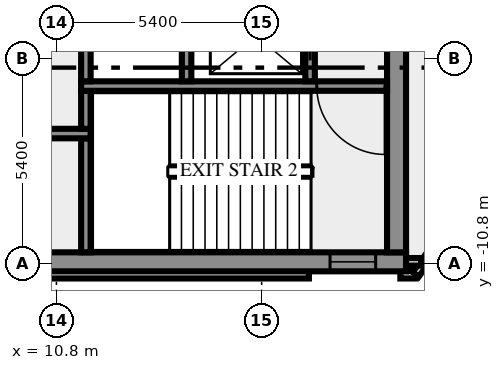
"""IFC4 building model, lengths in metres.
Left out: names, types, materials, properties, quantities, classifications, styles, units other than length and angle.
Written with IfcOpenShell. Run it as: python <this file> out.ifc"""

import sys

from ifc_helpers import new_model, si_unit, direction, frame, frame_2d, origin, place, context, subcontext, project, spatial, rectangle, extrude, element, fill, save


model = new_model("IFC4")
c1 = context("Model", 3, precision=1e-05, world=origin(), true_north=direction((0.0, 1.0)))
c2 = subcontext(c1, "Body", "Model", "MODEL_VIEW")
j1 = project(units=[si_unit("LENGTHUNIT", "METRE"), si_unit("PLANEANGLEUNIT", "RADIAN")], contexts=[c1])
p1 = place(None, origin())
s1 = spatial("IfcSite", under=j1, at=p1, CompositionType="ELEMENT")
p2 = place(p1, origin())
s2 = spatial("IfcBuilding", under=s1, at=p2, CompositionType="ELEMENT")
p3 = place(p2, frame((0.0, 0.0, 343.0)))
s3 = spatial("IfcBuildingStorey", under=s2, at=p3, CompositionType="ELEMENT", Elevation=343.0)
p4 = place(p3, frame((-17.444, -11.088, 0.0), z_axis=(0.0, 0.0, 1.0), x_axis=(1.0, 0.0, 0.0)))
e1 = element("IfcWall", 1, at=p4, inside=s3, PredefinedType="SOLIDWALL", context=c2, shape_type="SweptSolid", body=[
    extrude(rectangle(XDim=34.888, YDim=0.2, at=frame_2d((17.444, 0.0))), origin(), (0.0, 0.0, 1.0), 3.65),
])
p5 = place(p3, frame((19.85, -11.088, 0.0), z_axis=(0.0, 0.0, 1.0), x_axis=(1.0, 0.0, 0.0)))
e2 = element("IfcWall", 2, at=p5, inside=s3, PredefinedType="SOLIDWALL", context=c2, shape_type="SweptSolid", body=[
    extrude(rectangle(XDim=0.406, YDim=0.2, at=frame_2d((0.203, 0.0))), origin(), (0.0, 0.0, 1.0), 3.65),
])
p6 = place(p3, frame((20.253, -11.083, 0.0), z_axis=(0.0, 0.0, 1.0), x_axis=(0.587766567315, 0.809030569476, 0.0)))
e3 = element("IfcWall", 3, at=p6, inside=s3, PredefinedType="SOLIDWALL", context=c2, shape_type="SweptSolid", body=[
    extrude(rectangle(XDim=2.688, YDim=0.2, at=frame_2d((1.344, 0.0))), origin(), (0.0, 0.0, 1.0), 3.65),
])
p7 = place(p3, frame((19.98, -10.75, 0.0), z_axis=(0.0, 0.0, 1.0), x_axis=(1.0, 0.0, 0.0)))
e4 = element("IfcWall", 4, at=p7, inside=s3, PredefinedType="SOLIDWALL", context=c2, shape_type="SweptSolid", body=[
    extrude(rectangle(XDim=0.417, YDim=0.2, at=frame_2d((0.208, 0.0))), origin(), (0.0, 0.0, 1.0), 3.65),
])
p8 = place(p3, frame((-20.0, -10.75, 0.0), z_axis=(0.0, 0.0, 1.0), x_axis=(1.0, 0.0, 0.0)))
e5 = element("IfcWall", 5, at=p8, inside=s3, PredefinedType="SHEAR", context=c2, shape_type="SweptSolid", body=[
    extrude(rectangle(XDim=40.0, YDim=0.5, at=frame_2d((20.0, 0.0))), origin(), (0.0, 0.0, 1.0), 3.65),
])
p9 = place(p8, frame((0.8, 0.0, 1.0)))
e6 = element("IfcOpeningElement", 6, at=p9, cuts=e5, PredefinedType="OPENING", context=c2, shape_type="SweptSolid", body=[
    extrude(rectangle(XDim=1.2, YDim=1.2, at=frame_2d((0.6, 0.6))), frame((0.0, 0.26, 0.0), z_axis=(0.0, -1.0, 0.0), x_axis=(1.0, 0.0, 0.0)), (0.0, 0.0, 1.0), 0.52),
])
p10 = place(p8, frame((38.0, 0.0, 1.0)))
e7 = element("IfcOpeningElement", 7, at=p10, cuts=e5, PredefinedType="OPENING", context=c2, shape_type="SweptSolid", body=[
    extrude(rectangle(XDim=1.2, YDim=1.2, at=frame_2d((0.6, 0.6))), frame((0.0, 0.26, 0.0), z_axis=(0.0, -1.0, 0.0), x_axis=(1.0, 0.0, 0.0)), (0.0, 0.0, 1.0), 0.52),
])
p11 = place(p3, frame((11.575, -10.5, 0.0), z_axis=(0.0, 0.0, 1.0), x_axis=(0.0, 1.0, 0.0)))
e8 = element("IfcWall", 8, at=p11, inside=s3, PredefinedType="SHEAR", context=c2, shape_type="SweptSolid", body=[
    extrude(rectangle(XDim=3.0, YDim=0.25, at=frame_2d((1.5, 0.0))), origin(), (0.0, 0.0, 1.0), 3.65),
])
p12 = place(p3, frame((19.75, -10.5, 0.0), z_axis=(0.0, 0.0, 1.0), x_axis=(0.0, 1.0, 0.0)))
e9 = element("IfcWall", 9, at=p12, inside=s3, PredefinedType="SHEAR", context=c2, shape_type="SweptSolid", body=[
    extrude(rectangle(XDim=8.8, YDim=0.5, at=frame_2d((4.4, 0.0))), origin(), (0.0, 0.0, 1.0), 3.65),
])
p13 = place(p3, frame((11.7, -7.375, 0.0), z_axis=(0.0, 0.0, 1.0), x_axis=(-1.0, 0.0, 0.0)))
e10 = element("IfcWall", 10, at=p13, inside=s3, PredefinedType="SHEAR", context=c2, shape_type="SweptSolid", body=[
    extrude(rectangle(XDim=23.4, YDim=0.25, at=frame_2d((11.7, 0.0))), origin(), (0.0, 0.0, 1.0), 3.65),
])
p14 = place(p13, frame((22.225, 0.0, 0.0)))
e11 = element("IfcOpeningElement", 11, at=p14, cuts=e10, PredefinedType="OPENING", context=c2, shape_type="SweptSolid", body=[
    extrude(rectangle(XDim=0.8, YDim=2.1, at=frame_2d((0.4, 1.05))), frame((0.0, 0.135, 0.0), z_axis=(0.0, -1.0, 0.0), x_axis=(1.0, 0.0, 0.0)), (0.0, 0.0, 1.0), 0.27),
])
p15 = place(p13, frame((20.2, 0.0, 0.0)))
e12 = element("IfcOpeningElement", 12, at=p15, cuts=e10, PredefinedType="OPENING", context=c2, shape_type="SweptSolid", body=[
    extrude(rectangle(XDim=1.1, YDim=2.1, at=frame_2d((0.55, 1.05))), frame((0.0, 0.135, 0.0), z_axis=(0.0, -1.0, 0.0), x_axis=(1.0, 0.0, 0.0)), (0.0, 0.0, 1.0), 0.27),
])
p16 = place(p13, frame((17.7, 0.0, 0.0)))
e13 = element("IfcOpeningElement", 13, at=p16, cuts=e10, PredefinedType="OPENING", context=c2, shape_type="SweptSolid", body=[
    extrude(rectangle(XDim=1.1, YDim=2.1, at=frame_2d((0.55, 1.05))), frame((0.0, 0.135, 0.0), z_axis=(0.0, -1.0, 0.0), x_axis=(1.0, 0.0, 0.0)), (0.0, 0.0, 1.0), 0.27),
])
p17 = place(p13, frame((15.975, 0.0, 0.0)))
e14 = element("IfcOpeningElement", 14, at=p17, cuts=e10, PredefinedType="OPENING", context=c2, shape_type="SweptSolid", body=[
    extrude(rectangle(XDim=0.8, YDim=2.1, at=frame_2d((0.4, 1.05))), frame((0.0, 0.135, 0.0), z_axis=(0.0, -1.0, 0.0), x_axis=(1.0, 0.0, 0.0)), (0.0, 0.0, 1.0), 0.27),
])
p18 = place(p13, frame((14.65, 0.0, 0.0)))
e15 = element("IfcOpeningElement", 15, at=p18, cuts=e10, PredefinedType="OPENING", context=c2, shape_type="SweptSolid", body=[
    extrude(rectangle(XDim=0.8, YDim=2.1, at=frame_2d((0.4, 1.05))), frame((0.0, 0.135, 0.0), z_axis=(0.0, -1.0, 0.0), x_axis=(1.0, 0.0, 0.0)), (0.0, 0.0, 1.0), 0.27),
])
p19 = place(p13, frame((12.8, 0.0, 0.0)))
e16 = element("IfcOpeningElement", 16, at=p19, cuts=e10, PredefinedType="OPENING", context=c2, shape_type="SweptSolid", body=[
    extrude(rectangle(XDim=0.9, YDim=2.1, at=frame_2d((0.45, 1.05))), frame((0.0, 0.135, 0.0), z_axis=(0.0, -1.0, 0.0), x_axis=(1.0, 0.0, 0.0)), (0.0, 0.0, 1.0), 0.27),
])
p20 = place(p13, frame((10.7, 0.0, 0.0)))
e17 = element("IfcOpeningElement", 17, at=p20, cuts=e10, PredefinedType="OPENING", context=c2, shape_type="SweptSolid", body=[
    extrude(rectangle(XDim=0.9, YDim=2.1, at=frame_2d((0.45, 1.05))), frame((0.0, 0.135, 0.0), z_axis=(0.0, -1.0, 0.0), x_axis=(1.0, 0.0, 0.0)), (0.0, 0.0, 1.0), 0.27),
])
p21 = place(p13, frame((4.7, 0.0, 0.0)))
e18 = element("IfcOpeningElement", 18, at=p21, cuts=e10, PredefinedType="OPENING", context=c2, shape_type="SweptSolid", body=[
    extrude(rectangle(XDim=0.9, YDim=2.1, at=frame_2d((0.45, 1.05))), frame((0.0, 0.135, 0.0), z_axis=(0.0, -1.0, 0.0), x_axis=(1.0, 0.0, 0.0)), (0.0, 0.0, 1.0), 0.27),
])
p22 = place(p3, frame((11.575, -7.25, 0.0), z_axis=(0.0, 0.0, 1.0), x_axis=(0.0, 1.0, 0.0)))
e19 = element("IfcWall", 19, at=p22, inside=s3, PredefinedType="SHEAR", context=c2, shape_type="SweptSolid", body=[
    extrude(rectangle(XDim=1.0, YDim=0.25, at=frame_2d((0.5, 0.0))), origin(), (0.0, 0.0, 1.0), 3.65),
])
p23 = place(p3, frame((19.5, -6.125, 0.0), z_axis=(0.0, 0.0, 1.0), x_axis=(-1.0, 0.0, 0.0)))
e20 = element("IfcWall", 20, at=p23, inside=s3, PredefinedType="SHEAR", context=c2, shape_type="SweptSolid", body=[
    extrude(rectangle(XDim=8.05, YDim=0.25, at=frame_2d((4.025, 0.0))), origin(), (0.0, 0.0, 1.0), 3.65),
])
p24 = place(p23, frame((0.05, 0.0, 0.0)))
e21 = element("IfcOpeningElement", 21, at=p24, cuts=e20, PredefinedType="OPENING", context=c2, shape_type="SweptSolid", body=[
    extrude(rectangle(XDim=1.8, YDim=2.1, at=frame_2d((0.9, 1.05))), frame((0.0, 0.135, 0.0), z_axis=(0.0, -1.0, 0.0), x_axis=(1.0, 0.0, 0.0)), (0.0, 0.0, 1.0), 0.27),
])
p25 = place(p3, frame((11.575, -6.0, 0.0), z_axis=(0.0, 0.0, 1.0), x_axis=(0.0, 1.0, 0.0)))
e22 = element("IfcWall", 22, at=p25, inside=s3, PredefinedType="SHEAR", context=c2, shape_type="SweptSolid", body=[
    extrude(rectangle(XDim=1.75, YDim=0.25, at=frame_2d((0.875, 0.0))), origin(), (0.0, 0.0, 1.0), 3.65),
])
p26 = place(p3, frame((14.225, -6.0, 0.0), z_axis=(0.0, 0.0, 1.0), x_axis=(0.0, 1.0, 0.0)))
e23 = element("IfcWall", 23, at=p26, inside=s3, PredefinedType="SHEAR", context=c2, shape_type="SweptSolid", body=[
    extrude(rectangle(XDim=4.3, YDim=0.25, at=frame_2d((2.15, 0.0))), origin(), (0.0, 0.0, 1.0), 3.65),
])
p27 = place(p3, frame((17.475, -6.0, 0.0), z_axis=(0.0, 0.0, 1.0), x_axis=(0.0, 1.0, 0.0)))
e24 = element("IfcWall", 24, at=p27, inside=s3, PredefinedType="SHEAR", context=c2, shape_type="SweptSolid", body=[
    extrude(rectangle(XDim=4.3, YDim=0.25, at=frame_2d((2.15, 0.0))), origin(), (0.0, 0.0, 1.0), 3.65),
])
p28 = place(p27, frame((0.55, 0.0, 0.0)))
e25 = element("IfcOpeningElement", 25, at=p28, cuts=e24, PredefinedType="OPENING", context=c2, shape_type="SweptSolid", body=[
    extrude(rectangle(XDim=1.3, YDim=2.1, at=frame_2d((0.65, 1.05))), frame((0.0, 0.135, 0.0), z_axis=(0.0, -1.0, 0.0), x_axis=(1.0, 0.0, 0.0)), (0.0, 0.0, 1.0), 0.27),
])
p29 = place(p10, origin())
e26 = element("IfcWindow", 26, at=p29, inside=s3, PartitioningType="SINGLE_PANEL", PredefinedType="WINDOW", context=c2, shape_type="SweptSolid", body=[
    extrude(rectangle(XDim=1.2, YDim=1.2, at=frame_2d((0.6, 0.6))), frame((0.0, 0.03, 0.0), z_axis=(0.0, -1.0, 0.0), x_axis=(1.0, 0.0, 0.0)), (0.0, 0.0, 1.0), 0.06),
])
fill(e7, e26)
p30 = place(p24, origin())
e27 = element("IfcDoor", 27, at=p30, inside=s3, OperationType="DOUBLE_DOOR_SINGLE_SWING", PredefinedType="DOOR", context=c2, shape_type="SweptSolid", body=[
    extrude(rectangle(XDim=1.8, YDim=2.1, at=frame_2d((0.9, 1.05))), frame((0.0, 0.025, 0.0), z_axis=(0.0, -1.0, 0.0), x_axis=(1.0, 0.0, 0.0)), (0.0, 0.0, 1.0), 0.05),
])
fill(e21, e27)
p31 = place(p28, origin())
e28 = element("IfcDoor", 28, at=p31, inside=s3, OperationType="DOUBLE_DOOR_SLIDING", PredefinedType="DOOR", context=c2, shape_type="SweptSolid", body=[
    extrude(rectangle(XDim=1.3, YDim=2.1, at=frame_2d((0.65, 1.05))), frame((0.0, 0.025, 0.0), z_axis=(0.0, -1.0, 0.0), x_axis=(1.0, 0.0, 0.0)), (0.0, 0.0, 1.0), 0.05),
])
fill(e25, e28)
save(model, sys.argv[1])
